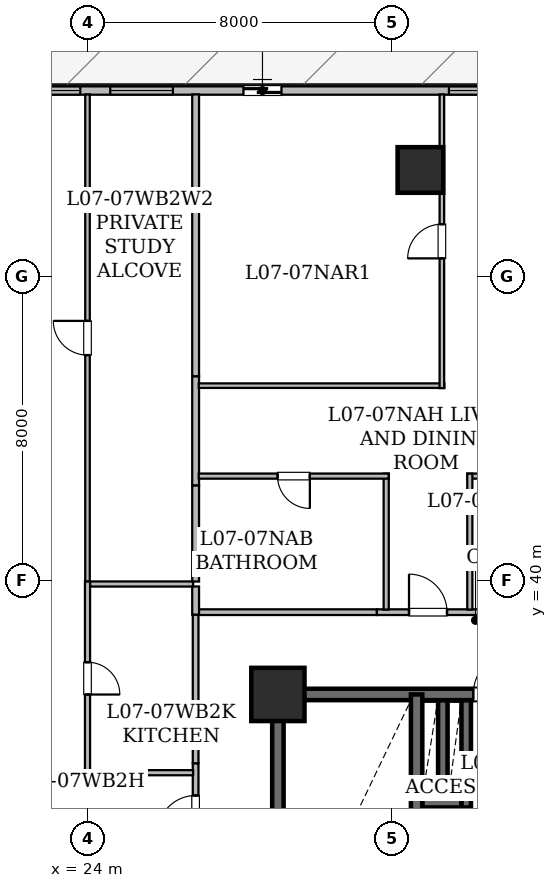
"""IFC4 building model, lengths in metres.
Left out: names, types, materials, properties, quantities, classifications, styles, units other than length and angle.
Written with IfcOpenShell. Run it as: python <this file> out.ifc"""

import sys

from ifc_helpers import new_model, si_unit, direction, frame, frame_2d, origin, origin_2d, place, context, subcontext, project, spatial, rectangle, hollow_rectangle, extrude, element, fill, save


model = new_model("IFC4")
c1 = context("Model", 3, precision=1e-05, world=origin(), true_north=direction((0.0, 1.0)))
c2 = subcontext(c1, "Body", "Model", "MODEL_VIEW")
j1 = project(units=[si_unit("LENGTHUNIT", "METRE"), si_unit("PLANEANGLEUNIT", "RADIAN")], contexts=[c1])
p1 = place(None, origin())
s1 = spatial("IfcSite", under=j1, at=p1, CompositionType="ELEMENT")
p2 = place(p1, origin())
s2 = spatial("IfcBuilding", under=s1, at=p2, CompositionType="ELEMENT")
p3 = place(p2, frame((0.0, 0.0, 33.3)))
s3 = spatial("IfcBuildingStorey", under=s2, at=p3, CompositionType="ELEMENT", Elevation=33.3)
p4 = place(p3, frame((29.0, 37.0, 0.0), z_axis=(0.0, 0.0, 1.0), x_axis=(1.0, 0.0, 0.0)))
e1 = element("IfcColumn", 1, at=p4, inside=s3, PredefinedType="COLUMN", context=c2, shape_type="SweptSolid", body=[
    extrude(hollow_rectangle(XDim=1.4, YDim=1.4, WallThickness=0.07, at=origin_2d()), origin(), (0.0, 0.0, 1.0), 3.65),
])
p5 = place(p3, frame((32.75, 50.8, 0.025), z_axis=(0.0, 0.0, 1.0), x_axis=(1.0, 0.0, 0.0)))
e2 = element("IfcColumn", 2, at=p5, inside=s3, PredefinedType="COLUMN", context=c2, shape_type="SweptSolid", body=[
    extrude(hollow_rectangle(XDim=1.2, YDim=1.2, WallThickness=0.06, at=origin_2d()), origin(), (0.0, 0.0, 1.0), 3.625),
])
p6 = place(p3, frame((8.315, 52.89, 0.0), z_axis=(0.0, 0.0, 1.0), x_axis=(1.0, 0.0, 0.0)))
e3 = element("IfcWall", 3, at=p6, inside=s3, PredefinedType="STANDARD", context=c2, shape_type="SweptSolid", body=[
    extrude(rectangle(XDim=37.439, YDim=0.22, at=frame_2d((18.719, 0.0))), origin(), (0.0, 0.0, 1.0), 3.43),
])
p7 = place(p6, frame((19.779, 0.0, 0.0)))
e4 = element("IfcOpeningElement", 4, at=p7, cuts=e3, PredefinedType="OPENING", context=c2, shape_type="SweptSolid", body=[
    extrude(rectangle(XDim=1.0, YDim=2.15, at=frame_2d((0.5, 1.075))), frame((0.0, 0.12, 0.0), z_axis=(0.0, -1.0, 0.0), x_axis=(1.0, 0.0, 0.0)), (0.0, 0.0, 1.0), 0.24),
])
p8 = place(p6, frame((4.524, 0.0, 0.85)))
e5 = element("IfcOpeningElement", 5, at=p8, cuts=e3, PredefinedType="OPENING", context=c2, shape_type="SweptSolid", body=[
    extrude(rectangle(XDim=1.65, YDim=1.55, at=frame_2d((0.825, 0.775))), frame((0.0, 0.12, 0.0), z_axis=(0.0, -1.0, 0.0), x_axis=(1.0, 0.0, 0.0)), (0.0, 0.0, 1.0), 0.24),
])
p9 = place(p6, frame((16.273, 0.0, 0.85)))
e6 = element("IfcOpeningElement", 6, at=p9, cuts=e3, PredefinedType="OPENING", context=c2, shape_type="SweptSolid", body=[
    extrude(rectangle(XDim=1.65, YDim=1.55, at=frame_2d((0.825, 0.775))), frame((0.0, 0.12, 0.0), z_axis=(0.0, -1.0, 0.0), x_axis=(1.0, 0.0, 0.0)), (0.0, 0.0, 1.0), 0.24),
])
p10 = place(p6, frame((14.285, 0.0, 0.8)))
e7 = element("IfcOpeningElement", 7, at=p10, cuts=e3, PredefinedType="OPENING", context=c2, shape_type="SweptSolid", body=[
    extrude(rectangle(XDim=1.2, YDim=1.5, at=frame_2d((0.6, 0.75))), frame((0.0, 0.12, 0.0), z_axis=(0.0, -1.0, 0.0), x_axis=(1.0, 0.0, 0.0)), (0.0, 0.0, 1.0), 0.24),
])
p11 = place(p6, frame((10.238, 0.0, 0.85)))
e8 = element("IfcOpeningElement", 8, at=p11, cuts=e3, PredefinedType="OPENING", context=c2, shape_type="SweptSolid", body=[
    extrude(rectangle(XDim=1.65, YDim=1.55, at=frame_2d((0.825, 0.775))), frame((0.0, 0.12, 0.0), z_axis=(0.0, -1.0, 0.0), x_axis=(1.0, 0.0, 0.0)), (0.0, 0.0, 1.0), 0.24),
])
p12 = place(p6, frame((25.185, 0.0, 0.8)))
e9 = element("IfcOpeningElement", 9, at=p12, cuts=e3, PredefinedType="OPENING", context=c2, shape_type="SweptSolid", body=[
    extrude(rectangle(XDim=1.2, YDim=1.5, at=frame_2d((0.6, 0.75))), frame((0.0, 0.12, 0.0), z_axis=(0.0, -1.0, 0.0), x_axis=(1.0, 0.0, 0.0)), (0.0, 0.0, 1.0), 0.24),
])
p13 = place(p6, frame((28.985, 0.0, 0.85)))
e10 = element("IfcOpeningElement", 10, at=p13, cuts=e3, PredefinedType="OPENING", context=c2, shape_type="SweptSolid", body=[
    extrude(rectangle(XDim=1.65, YDim=1.55, at=frame_2d((0.825, 0.775))), frame((0.0, 0.12, 0.0), z_axis=(0.0, -1.0, 0.0), x_axis=(1.0, 0.0, 0.0)), (0.0, 0.0, 1.0), 0.24),
])
p14 = place(p6, frame((33.49, 0.0, 0.85)))
e11 = element("IfcOpeningElement", 11, at=p14, cuts=e3, PredefinedType="OPENING", context=c2, shape_type="SweptSolid", body=[
    extrude(rectangle(XDim=1.65, YDim=1.55, at=frame_2d((0.825, 0.775))), frame((0.0, 0.12, 0.0), z_axis=(0.0, -1.0, 0.0), x_axis=(1.0, 0.0, 0.0)), (0.0, 0.0, 1.0), 0.24),
])
p15 = place(p6, frame((35.942, 0.0, 0.85)))
e12 = element("IfcOpeningElement", 12, at=p15, cuts=e3, PredefinedType="OPENING", context=c2, shape_type="SweptSolid", body=[
    extrude(rectangle(XDim=1.35, YDim=1.5, at=frame_2d((0.675, 0.75))), frame((0.0, 0.12, 0.0), z_axis=(0.0, -1.0, 0.0), x_axis=(1.0, 0.0, 0.0)), (0.0, 0.0, 1.0), 0.24),
])
p16 = place(p3, frame((29.0, 28.0, 0.0), z_axis=(0.0, 0.0, 1.0), x_axis=(0.0, 1.0, 0.0)))
e13 = element("IfcWall", 13, at=p16, inside=s3, PredefinedType="SHEAR", context=c2, shape_type="SweptSolid", body=[
    extrude(rectangle(XDim=9.0, YDim=0.3, at=frame_2d((4.5, 0.0))), origin(), (0.0, 0.0, 1.0), 3.43),
])
p17 = place(p3, frame((29.0, 37.0, 0.0), z_axis=(0.0, 0.0, 1.0), x_axis=(1.0, 0.0, 0.0)))
e14 = element("IfcWall", 14, at=p17, inside=s3, PredefinedType="SHEAR", context=c2, shape_type="SweptSolid", body=[
    extrude(rectangle(XDim=10.4, YDim=0.3, at=frame_2d((5.2, 0.0))), origin(), (0.0, 0.0, 1.0), 3.43),
])
p18 = place(p17, frame((5.14, 0.0, 0.0)))
e15 = element("IfcOpeningElement", 15, at=p18, cuts=e14, PredefinedType="OPENING", context=c2, shape_type="SweptSolid", body=[
    extrude(rectangle(XDim=1.15, YDim=2.2, at=frame_2d((0.575, 1.1))), frame((0.0, 0.16, 0.0), z_axis=(0.0, -1.0, 0.0), x_axis=(1.0, 0.0, 0.0)), (0.0, 0.0, 1.0), 0.32),
])
p19 = place(p3, frame((32.65, 28.0, 0.0), z_axis=(0.0, 0.0, 1.0), x_axis=(0.0, 1.0, 0.0)))
e16 = element("IfcWall", 16, at=p19, inside=s3, PredefinedType="SHEAR", context=c2, shape_type="SweptSolid", body=[
    extrude(rectangle(XDim=9.0, YDim=0.3, at=frame_2d((4.5, 0.0))), origin(), (0.0, 0.0, 1.0), 3.43),
])
p20 = place(p19, frame((0.72, 0.0, 0.0)))
e17 = element("IfcOpeningElement", 17, at=p20, cuts=e16, PredefinedType="OPENING", context=c2, shape_type="SweptSolid", body=[
    extrude(rectangle(XDim=1.0, YDim=2.15, at=frame_2d((0.5, 1.075))), frame((0.0, 0.16, 0.0), z_axis=(0.0, -1.0, 0.0), x_axis=(1.0, 0.0, 0.0)), (0.0, 0.0, 1.0), 0.32),
])
p21 = place(p3, frame((33.955, 34.025, 0.0), z_axis=(0.0, 0.0, 1.0), x_axis=(0.0, 1.0, 0.0)))
e18 = element("IfcWall", 18, at=p21, inside=s3, PredefinedType="SHEAR", context=c2, shape_type="SweptSolid", body=[
    extrude(rectangle(XDim=2.821, YDim=0.25, at=frame_2d((1.411, 0.0))), origin(), (0.0, 0.0, 1.0), 3.43),
])
p22 = place(p3, frame((32.804, 34.15, 0.0), z_axis=(0.0, 0.0, 1.0), x_axis=(1.0, 0.0, 0.0)))
e19 = element("IfcWall", 19, at=p22, inside=s3, PredefinedType="SHEAR", context=c2, shape_type="SweptSolid", body=[
    extrude(rectangle(XDim=1.022, YDim=0.25, at=frame_2d((0.511, 0.0))), origin(), (0.0, 0.0, 1.0), 3.43),
])
p23 = place(p3, frame((33.34, 34.279, 0.0), z_axis=(0.0, 0.0, 1.0), x_axis=(0.0, 1.0, 0.0)))
e20 = element("IfcWall", 20, at=p23, inside=s3, PredefinedType="SHEAR", context=c2, shape_type="SweptSolid", body=[
    extrude(rectangle(XDim=2.567, YDim=0.25, at=frame_2d((1.283, 0.0))), origin(), (0.0, 0.0, 1.0), 3.43),
])
p24 = place(p3, frame((26.835, 32.492, 0.0), z_axis=(0.0, 0.0, 1.0), x_axis=(0.0, 1.0, 0.0)))
e21 = element("IfcWall", 21, at=p24, inside=s3, PredefinedType="STANDARD", context=c2, shape_type="SweptSolid", body=[
    extrude(rectangle(XDim=2.698, YDim=0.15, at=frame_2d((1.349, 0.0))), origin(), (0.0, 0.0, 1.0), 3.43),
])
p25 = place(p24, frame((0.849, 0.0, 0.0)))
e22 = element("IfcOpeningElement", 22, at=p25, cuts=e21, PredefinedType="OPENING", context=c2, shape_type="SweptSolid", body=[
    extrude(rectangle(XDim=1.0, YDim=2.15, at=frame_2d((0.5, 1.075))), frame((0.0, 0.085, 0.0), z_axis=(0.0, -1.0, 0.0), x_axis=(1.0, 0.0, 0.0)), (0.0, 0.0, 1.0), 0.17),
])
p26 = place(p3, frame((26.835, 35.19, 0.0), z_axis=(0.0, 0.0, 1.0), x_axis=(0.0, 1.0, 0.0)))
e23 = element("IfcWall", 23, at=p26, inside=s3, PredefinedType="STANDARD", context=c2, shape_type="SweptSolid", body=[
    extrude(rectangle(XDim=3.91, YDim=0.15, at=frame_2d((1.955, 0.0))), origin(), (0.0, 0.0, 1.0), 2.647),
])
p27 = place(p3, frame((31.601, 39.165, 0.0), z_axis=(0.0, 0.0, 1.0), x_axis=(1.0, 0.0, 0.0)))
e24 = element("IfcWall", 24, at=p27, inside=s3, PredefinedType="STANDARD", context=c2, shape_type="SweptSolid", body=[
    extrude(rectangle(XDim=2.698, YDim=0.15, at=frame_2d((1.349, 0.0))), origin(), (0.0, 0.0, 1.0), 3.43),
])
p28 = place(p27, frame((0.849, 0.0, 0.0)))
e25 = element("IfcOpeningElement", 25, at=p28, cuts=e24, PredefinedType="OPENING", context=c2, shape_type="SweptSolid", body=[
    extrude(rectangle(XDim=1.0, YDim=2.15, at=frame_2d((0.5, 1.075))), frame((0.0, 0.085, 0.0), z_axis=(0.0, -1.0, 0.0), x_axis=(1.0, 0.0, 0.0)), (0.0, 0.0, 1.0), 0.17),
])
p29 = place(p3, frame((26.9, 39.165, 0.0), z_axis=(0.0, 0.0, 1.0), x_axis=(1.0, 0.0, 0.0)))
e26 = element("IfcWall", 26, at=p29, inside=s3, PredefinedType="STANDARD", context=c2, shape_type="SweptSolid", body=[
    extrude(rectangle(XDim=4.701, YDim=0.15, at=frame_2d((2.351, 0.0))), origin(), (0.0, 0.0, 1.0), 2.647),
])
p30 = place(p3, frame((23.99, 39.971, 0.0), z_axis=(0.0, 0.0, 1.0), x_axis=(0.0, 1.0, 0.0)))
e27 = element("IfcWall", 27, at=p30, inside=s3, PredefinedType="PARTITIONING", context=c2, shape_type="SweptSolid", body=[
    extrude(rectangle(XDim=12.817, YDim=0.12, at=frame_2d((6.409, 0.0))), origin(), (0.0, 0.0, 1.0), 2.803),
])
p31 = place(p30, frame((5.958, 0.0, 0.0)))
e28 = element("IfcOpeningElement", 28, at=p31, cuts=e27, PredefinedType="OPENING", context=c2, shape_type="SweptSolid", body=[
    extrude(rectangle(XDim=0.9, YDim=2.1, at=frame_2d((0.45, 1.05))), frame((0.0, 0.07, 0.0), z_axis=(0.0, -1.0, 0.0), x_axis=(1.0, 0.0, 0.0)), (0.0, 0.0, 1.0), 0.14),
])
p32 = place(p3, frame((26.77, 39.906, 0.0), z_axis=(0.0, 0.0, 1.0), x_axis=(-1.0, 0.0, 0.0)))
e29 = element("IfcWall", 29, at=p32, inside=s3, PredefinedType="PARTITIONING", context=c2, shape_type="SweptSolid", body=[
    extrude(rectangle(XDim=2.715, YDim=0.135, at=frame_2d((1.357, 0.0))), origin(), (0.0, 0.0, 1.0), 3.43),
])
p33 = place(p3, frame((26.835, 45.374, 0.0), z_axis=(0.0, 0.0, 1.0), x_axis=(0.0, -1.0, 0.0)))
e30 = element("IfcWall", 30, at=p33, inside=s3, PredefinedType="STANDARD", context=c2, shape_type="SweptSolid", body=[
    extrude(rectangle(XDim=2.878, YDim=0.18, at=frame_2d((1.439, 0.0))), origin(), (0.0, 0.0, 1.0), 2.957),
])
p34 = place(p3, frame((26.835, 42.496, 0.0), z_axis=(0.0, 0.0, 1.0), x_axis=(0.0, -1.0, 0.0)))
e31 = element("IfcWall", 31, at=p34, inside=s3, PredefinedType="STANDARD", context=c2, shape_type="SweptSolid", body=[
    extrude(rectangle(XDim=2.525, YDim=0.18, at=frame_2d((1.263, 0.0))), origin(), (0.0, 0.0, 1.0), 2.957),
])
p35 = place(p3, frame((26.835, 52.788, 0.0), z_axis=(0.0, 0.0, 1.0), x_axis=(0.0, -1.0, 0.0)))
e32 = element("IfcWall", 32, at=p35, inside=s3, PredefinedType="STANDARD", context=c2, shape_type="SweptSolid", body=[
    extrude(rectangle(XDim=7.414, YDim=0.18, at=frame_2d((3.707, 0.0))), origin(), (0.0, 0.0, 1.0), 2.803),
])
p36 = place(p3, frame((23.99, 39.971, 0.0), z_axis=(0.0, 0.0, 1.0), x_axis=(0.0, -1.0, 0.0)))
e33 = element("IfcWall", 33, at=p36, inside=s3, PredefinedType="PARTITIONING", context=c2, shape_type="SweptSolid", body=[
    extrude(rectangle(XDim=5.095, YDim=0.135, at=frame_2d((2.547, 0.0))), origin(), (0.0, 0.0, 1.0), 2.647),
])
p37 = place(p36, frame((2.123, 0.0, 0.0)))
e34 = element("IfcOpeningElement", 34, at=p37, cuts=e33, PredefinedType="OPENING", context=c2, shape_type="SweptSolid", body=[
    extrude(rectangle(XDim=0.85, YDim=2.1, at=frame_2d((0.425, 1.05))), frame((0.0, 0.077, 0.0), z_axis=(0.0, -1.0, 0.0), x_axis=(1.0, 0.0, 0.0)), (0.0, 0.0, 1.0), 0.155),
])
p38 = place(p3, frame((23.925, 34.941, 0.0), z_axis=(0.0, 0.0, 1.0), x_axis=(1.0, 0.0, 0.0)))
e35 = element("IfcWall", 35, at=p38, inside=s3, PredefinedType="PARTITIONING", context=c2, shape_type="SweptSolid", body=[
    extrude(rectangle(XDim=2.845, YDim=0.135, at=frame_2d((1.422, 0.0))), origin(), (0.0, 0.0, 1.0), 3.43),
])
p39 = place(p3, frame((26.835, 39.841, 0.0), z_axis=(0.0, 0.0, 1.0), x_axis=(0.0, -1.0, 0.0)))
e36 = element("IfcWall", 36, at=p39, inside=s3, PredefinedType="STANDARD", context=c2, shape_type="SweptSolid", body=[
    extrude(rectangle(XDim=0.741, YDim=0.18, at=frame_2d((0.371, 0.0))), origin(), (0.0, 0.0, 1.0), 3.43),
])
p40 = place(p3, frame((31.85, 39.232, 0.0), z_axis=(0.0, 0.0, 1.0), x_axis=(0.0, 1.0, 0.0)))
e37 = element("IfcWall", 37, at=p40, inside=s3, PredefinedType="PARTITIONING", context=c2, shape_type="SweptSolid", body=[
    extrude(rectangle(XDim=3.578, YDim=0.135, at=frame_2d((1.789, 0.0))), origin(), (0.0, 0.0, 1.0), 2.957),
])
p41 = place(p3, frame((31.915, 42.745, 0.0), z_axis=(0.0, 0.0, 1.0), x_axis=(-1.0, 0.0, 0.0)))
e38 = element("IfcWall", 38, at=p41, inside=s3, PredefinedType="PARTITIONING", context=c2, shape_type="SweptSolid", body=[
    extrude(rectangle(XDim=4.998, YDim=0.135, at=frame_2d((2.499, 0.0))), origin(), (0.0, 0.0, 1.0), 2.647),
])
p42 = place(p41, frame((2.074, 0.0, 0.0)))
e39 = element("IfcOpeningElement", 39, at=p42, cuts=e38, PredefinedType="OPENING", context=c2, shape_type="SweptSolid", body=[
    extrude(rectangle(XDim=0.85, YDim=2.1, at=frame_2d((0.425, 1.05))), frame((0.0, 0.077, 0.0), z_axis=(0.0, -1.0, 0.0), x_axis=(1.0, 0.0, 0.0)), (0.0, 0.0, 1.0), 0.155),
])
p43 = place(p3, frame((41.3, 42.745, 0.0), z_axis=(0.0, 0.0, 1.0), x_axis=(-1.0, 0.0, 0.0)))
e40 = element("IfcWall", 40, at=p43, inside=s3, PredefinedType="PARTITIONING", context=c2, shape_type="SweptSolid", body=[
    extrude(rectangle(XDim=7.315, YDim=0.135, at=frame_2d((3.657, 0.0))), origin(), (0.0, 0.0, 1.0), 2.957),
])
p44 = place(p43, frame((3.233, 0.0, 0.0)))
e41 = element("IfcOpeningElement", 41, at=p44, cuts=e40, PredefinedType="OPENING", context=c2, shape_type="SweptSolid", body=[
    extrude(rectangle(XDim=0.85, YDim=2.1, at=frame_2d((0.425, 1.05))), frame((0.0, 0.077, 0.0), z_axis=(0.0, -1.0, 0.0), x_axis=(1.0, 0.0, 0.0)), (0.0, 0.0, 1.0), 0.155),
])
p45 = place(p3, frame((34.05, 42.81, 0.0), z_axis=(0.0, 0.0, 1.0), x_axis=(0.0, -1.0, 0.0)))
e42 = element("IfcWall", 42, at=p45, inside=s3, PredefinedType="PARTITIONING", context=c2, shape_type="SweptSolid", body=[
    extrude(rectangle(XDim=3.578, YDim=0.135, at=frame_2d((1.789, 0.0))), origin(), (0.0, 0.0, 1.0), 2.957),
])
p46 = place(p3, frame((26.917, 45.125, 0.0), z_axis=(0.0, 0.0, 1.0), x_axis=(1.0, 0.0, 0.0)))
e43 = element("IfcWall", 43, at=p46, inside=s3, PredefinedType="PARTITIONING", context=c2, shape_type="SweptSolid", body=[
    extrude(rectangle(XDim=6.463, YDim=0.12, at=frame_2d((3.231, 0.0))), origin(), (0.0, 0.0, 1.0), 2.647),
])
p47 = place(p3, frame((33.315, 45.06, 0.0), z_axis=(0.0, 0.0, 1.0), x_axis=(0.0, 1.0, 0.0)))
e44 = element("IfcWall", 44, at=p47, inside=s3, PredefinedType="PARTITIONING", context=c2, shape_type="SweptSolid", body=[
    extrude(rectangle(XDim=7.728, YDim=0.12, at=frame_2d((3.864, 0.0))), origin(), (0.0, 0.0, 1.0), 2.803),
])
p48 = place(p47, frame((3.414, 0.0, 0.0)))
e45 = element("IfcOpeningElement", 45, at=p48, cuts=e44, PredefinedType="OPENING", context=c2, shape_type="SweptSolid", body=[
    extrude(rectangle(XDim=0.9, YDim=2.1, at=frame_2d((0.45, 1.05))), frame((0.0, 0.07, 0.0), z_axis=(0.0, -1.0, 0.0), x_axis=(1.0, 0.0, 0.0)), (0.0, 0.0, 1.0), 0.14),
])
p49 = place(p7, origin())
e46 = element("IfcDoor", 46, at=p49, inside=s3, OperationType="SLIDING_TO_LEFT", PredefinedType="DOOR", context=c2, shape_type="SweptSolid", body=[
    extrude(rectangle(XDim=1.0, YDim=2.15, at=frame_2d((0.5, 1.075))), frame((0.0, 0.025, 0.0), z_axis=(0.0, -1.0, 0.0), x_axis=(1.0, 0.0, 0.0)), (0.0, 0.0, 1.0), 0.05),
])
fill(e4, e46)
p50 = place(p9, origin())
e47 = element("IfcWindow", 47, at=p50, inside=s3, PartitioningType="SINGLE_PANEL", PredefinedType="WINDOW", context=c2, shape_type="SweptSolid", body=[
    extrude(rectangle(XDim=1.65, YDim=1.55, at=frame_2d((0.825, 0.775))), frame((0.0, 0.03, 0.0), z_axis=(0.0, -1.0, 0.0), x_axis=(1.0, 0.0, 0.0)), (0.0, 0.0, 1.0), 0.06),
])
fill(e6, e47)
p51 = place(p10, origin())
e48 = element("IfcWindow", 48, at=p51, inside=s3, PartitioningType="SINGLE_PANEL", PredefinedType="WINDOW", context=c2, shape_type="SweptSolid", body=[
    extrude(rectangle(XDim=1.2, YDim=1.5, at=frame_2d((0.6, 0.75))), frame((0.0, 0.03, 0.0), z_axis=(0.0, -1.0, 0.0), x_axis=(1.0, 0.0, 0.0)), (0.0, 0.0, 1.0), 0.06),
])
fill(e7, e48)
p52 = place(p12, origin())
e49 = element("IfcWindow", 49, at=p52, inside=s3, PartitioningType="SINGLE_PANEL", PredefinedType="WINDOW", context=c2, shape_type="SweptSolid", body=[
    extrude(rectangle(XDim=1.2, YDim=1.5, at=frame_2d((0.6, 0.75))), frame((0.0, 0.03, 0.0), z_axis=(0.0, -1.0, 0.0), x_axis=(1.0, 0.0, 0.0)), (0.0, 0.0, 1.0), 0.06),
])
fill(e9, e49)
p53 = place(p18, origin())
e50 = element("IfcDoor", 50, at=p53, inside=s3, OperationType="SINGLE_SWING_RIGHT", PredefinedType="DOOR", context=c2, shape_type="SweptSolid", body=[
    extrude(rectangle(XDim=1.15, YDim=2.2, at=frame_2d((0.575, 1.1))), frame((0.0, 0.025, 0.0), z_axis=(0.0, -1.0, 0.0), x_axis=(1.0, 0.0, 0.0)), (0.0, 0.0, 1.0), 0.05),
])
fill(e15, e50)
p54 = place(p25, origin())
e51 = element("IfcDoor", 51, at=p54, inside=s3, OperationType="SINGLE_SWING_LEFT", PredefinedType="DOOR", context=c2, shape_type="SweptSolid", body=[
    extrude(rectangle(XDim=1.0, YDim=2.15, at=frame_2d((0.5, 1.075))), frame((0.0, 0.025, 0.0), z_axis=(0.0, -1.0, 0.0), x_axis=(1.0, 0.0, 0.0)), (0.0, 0.0, 1.0), 0.05),
])
fill(e22, e51)
p55 = place(p28, origin())
e52 = element("IfcDoor", 52, at=p55, inside=s3, OperationType="SINGLE_SWING_LEFT", PredefinedType="DOOR", context=c2, shape_type="SweptSolid", body=[
    extrude(rectangle(XDim=1.0, YDim=2.15, at=frame_2d((0.5, 1.075))), frame((0.0, 0.025, 0.0), z_axis=(0.0, -1.0, 0.0), x_axis=(1.0, 0.0, 0.0)), (0.0, 0.0, 1.0), 0.05),
])
fill(e25, e52)
p56 = place(p31, origin())
e53 = element("IfcDoor", 53, at=p56, inside=s3, OperationType="SINGLE_SWING_RIGHT", PredefinedType="DOOR", context=c2, shape_type="SweptSolid", body=[
    extrude(rectangle(XDim=0.9, YDim=2.1, at=frame_2d((0.45, 1.05))), frame((0.0, 0.025, 0.0), z_axis=(0.0, -1.0, 0.0), x_axis=(1.0, 0.0, 0.0)), (0.0, 0.0, 1.0), 0.05),
])
fill(e28, e53)
p57 = place(p37, origin())
e54 = element("IfcDoor", 54, at=p57, inside=s3, OperationType="SINGLE_SWING_RIGHT", PredefinedType="DOOR", context=c2, shape_type="SweptSolid", body=[
    extrude(rectangle(XDim=0.85, YDim=2.1, at=frame_2d((0.425, 1.05))), frame((0.0, 0.025, 0.0), z_axis=(0.0, -1.0, 0.0), x_axis=(1.0, 0.0, 0.0)), (0.0, 0.0, 1.0), 0.05),
])
fill(e34, e54)
p58 = place(p42, origin())
e55 = element("IfcDoor", 55, at=p58, inside=s3, OperationType="SINGLE_SWING_LEFT", PredefinedType="DOOR", context=c2, shape_type="SweptSolid", body=[
    extrude(rectangle(XDim=0.85, YDim=2.1, at=frame_2d((0.425, 1.05))), frame((0.0, 0.025, 0.0), z_axis=(0.0, -1.0, 0.0), x_axis=(1.0, 0.0, 0.0)), (0.0, 0.0, 1.0), 0.05),
])
fill(e39, e55)
p59 = place(p48, origin())
e56 = element("IfcDoor", 56, at=p59, inside=s3, OperationType="SINGLE_SWING_LEFT", PredefinedType="DOOR", context=c2, shape_type="SweptSolid", body=[
    extrude(rectangle(XDim=0.9, YDim=2.1, at=frame_2d((0.45, 1.05))), frame((0.0, 0.025, 0.0), z_axis=(0.0, -1.0, 0.0), x_axis=(1.0, 0.0, 0.0)), (0.0, 0.0, 1.0), 0.05),
])
fill(e45, e56)
save(model, sys.argv[1])
